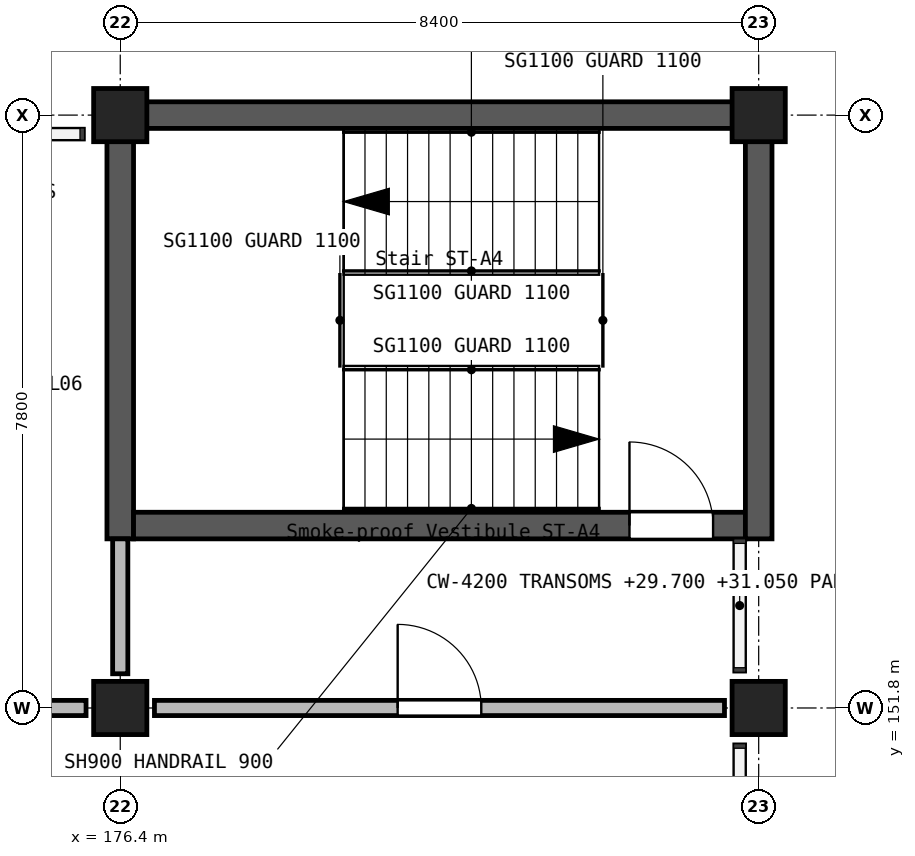
"""IFC4 building model, lengths in metres.
Left out: names, types, materials, properties, quantities, classifications, styles, units other than length and angle.
Written with IfcOpenShell. Run it as: python <this file> out.ifc"""

import sys

from ifc_helpers import new_model, si_unit, direction, frame, frame_2d, origin, origin_2d, place, context, subcontext, project, spatial, rectangle, extrude, element, fill, save


model = new_model("IFC4")
c1 = context("Model", 3, precision=1e-05, world=origin(), true_north=direction((0.0, 1.0)))
c2 = subcontext(c1, "Body", "Model", "MODEL_VIEW")
j1 = project(units=[si_unit("LENGTHUNIT", "METRE"), si_unit("PLANEANGLEUNIT", "RADIAN")], contexts=[c1])
p1 = place(None, origin())
s1 = spatial("IfcSite", under=j1, at=p1, CompositionType="ELEMENT")
p2 = place(p1, origin())
s2 = spatial("IfcBuilding", under=s1, at=p2, CompositionType="ELEMENT")
p3 = place(p2, frame((0.0, 0.0, 28.8)))
s3 = spatial("IfcBuildingStorey", under=s2, at=p3, CompositionType="ELEMENT", Elevation=28.8)
for number, where, z_axis, x_axis in (
    (1, (176.4, 151.8, 0.0), (0.0, 0.0, 1.0), (1.0, 0.0, 0.0)),
    (2, (176.4, 159.6, 0.0), (0.0, 0.0, 1.0), (1.0, 0.0, 0.0)),
    (3, (184.8, 151.8, 0.0), (0.0, 0.0, 1.0), (1.0, 0.0, 0.0)),
    (4, (184.8, 159.6, 0.0), (0.0, 0.0, 1.0), (1.0, 0.0, 0.0)),
):
    element("IfcColumn", number, at=place(p3, frame(where, z_axis=z_axis, x_axis=x_axis)), inside=s3, PredefinedType="COLUMN", context=c2, shape_type="SweptSolid", body=[
        extrude(rectangle(XDim=0.7, YDim=0.7, at=origin_2d()), origin(), (0.0, 0.0, 1.0), 3.9),
    ])
p4 = place(p3, frame((176.225, 159.6, 0.0), z_axis=(0.0, 0.0, 1.0), x_axis=(1.0, 0.0, 0.0)))
e5 = element("IfcWall", 5, at=p4, inside=s3, PredefinedType="SHEAR", context=c2, shape_type="SweptSolid", body=[
    extrude(rectangle(XDim=8.4, YDim=0.35, at=frame_2d((4.2, 0.0))), origin(), (0.0, 0.0, 1.0), 3.9),
])
p5 = place(p3, frame((176.4, 154.025, 0.0), z_axis=(0.0, 0.0, 1.0), x_axis=(0.0, 1.0, 0.0)))
e6 = element("IfcWall", 6, at=p5, inside=s3, PredefinedType="SHEAR", context=c2, shape_type="SweptSolid", body=[
    extrude(rectangle(XDim=5.4, YDim=0.35, at=frame_2d((2.7, 0.0))), origin(), (0.0, 0.0, 1.0), 3.9),
])
p6 = place(p3, frame((176.575, 154.2, 0.0), z_axis=(0.0, 0.0, 1.0), x_axis=(1.0, 0.0, 0.0)))
e7 = element("IfcWall", 7, at=p6, inside=s3, PredefinedType="SHEAR", context=c2, shape_type="SweptSolid", body=[
    extrude(rectangle(XDim=8.05, YDim=0.35, at=frame_2d((4.025, 0.0))), origin(), (0.0, 0.0, 1.0), 3.9),
])
p7 = place(p6, frame((6.525, 0.0, 0.0)))
e8 = element("IfcOpeningElement", 8, at=p7, cuts=e7, PredefinedType="OPENING", context=c2, shape_type="SweptSolid", body=[
    extrude(rectangle(XDim=1.1, YDim=2.1, at=frame_2d((0.55, 1.05))), frame((0.0, 0.185, 0.0), z_axis=(0.0, -1.0, 0.0), x_axis=(1.0, 0.0, 0.0)), (0.0, 0.0, 1.0), 0.37),
])
p8 = place(p3, frame((184.8, 154.025, 0.0), z_axis=(0.0, 0.0, 1.0), x_axis=(0.0, 1.0, 0.0)))
e9 = element("IfcWall", 9, at=p8, inside=s3, PredefinedType="SHEAR", context=c2, shape_type="SweptSolid", body=[
    extrude(rectangle(XDim=5.75, YDim=0.35, at=frame_2d((2.875, 0.0))), origin(), (0.0, 0.0, 1.0), 3.9),
])
p9 = place(p3, frame((172.1, 151.8, 0.0), z_axis=(0.0, 0.0, 1.0), x_axis=(1.0, 0.0, 0.0)))
e10 = element("IfcWall", 10, at=p9, inside=s3, PredefinedType="SOLIDWALL", context=c2, shape_type="SweptSolid", body=[
    extrude(rectangle(XDim=3.85, YDim=0.2, at=frame_2d((1.925, 0.0))), origin(), (0.0, 0.0, 1.0), 3.6),
])
p10 = place(p9, frame((1.7, 0.0, 0.0)))
e11 = element("IfcOpeningElement", 11, at=p10, cuts=e10, PredefinedType="OPENING", context=c2, shape_type="SweptSolid", body=[
    extrude(rectangle(XDim=1.0, YDim=2.1, at=frame_2d((0.5, 1.05))), frame((0.0, 0.11, 0.0), z_axis=(0.0, -1.0, 0.0), x_axis=(1.0, 0.0, 0.0)), (0.0, 0.0, 1.0), 0.22),
])
p11 = place(p3, frame((176.85, 151.8, 0.0), z_axis=(0.0, 0.0, 1.0), x_axis=(1.0, 0.0, 0.0)))
e12 = element("IfcWall", 12, at=p11, inside=s3, PredefinedType="SOLIDWALL", context=c2, shape_type="SweptSolid", body=[
    extrude(rectangle(XDim=7.5, YDim=0.2, at=frame_2d((3.75, 0.0))), origin(), (0.0, 0.0, 1.0), 3.6),
])
p12 = place(p11, frame((3.2, 0.0, 0.0)))
e13 = element("IfcOpeningElement", 13, at=p12, cuts=e12, PredefinedType="OPENING", context=c2, shape_type="SweptSolid", body=[
    extrude(rectangle(XDim=1.1, YDim=2.1, at=frame_2d((0.55, 1.05))), frame((0.0, 0.11, 0.0), z_axis=(0.0, -1.0, 0.0), x_axis=(1.0, 0.0, 0.0)), (0.0, 0.0, 1.0), 0.22),
])
p13 = place(p3, frame((176.4, 152.25, 0.0), z_axis=(0.0, 0.0, 1.0), x_axis=(0.0, 1.0, 0.0)))
e14 = element("IfcWall", 14, at=p13, inside=s3, PredefinedType="SOLIDWALL", context=c2, shape_type="SweptSolid", body=[
    extrude(rectangle(XDim=1.775, YDim=0.2, at=frame_2d((0.887, 0.0))), origin(), (0.0, 0.0, 1.0), 3.6),
])
p14 = place(p7, origin())
e15 = element("IfcDoor", 15, at=p14, inside=s3, OperationType="SINGLE_SWING_RIGHT", PredefinedType="DOOR", context=c2, shape_type="SweptSolid", body=[
    extrude(rectangle(XDim=1.1, YDim=2.1, at=frame_2d((0.55, 1.05))), frame((0.0, 0.025, 0.0), z_axis=(0.0, -1.0, 0.0), x_axis=(1.0, 0.0, 0.0)), (0.0, 0.0, 1.0), 0.05),
])
fill(e8, e15)
p15 = place(p12, origin())
e16 = element("IfcDoor", 16, at=p15, inside=s3, OperationType="SINGLE_SWING_RIGHT", PredefinedType="DOOR", context=c2, shape_type="SweptSolid", body=[
    extrude(rectangle(XDim=1.1, YDim=2.1, at=frame_2d((0.55, 1.05))), frame((0.0, 0.025, 0.0), z_axis=(0.0, -1.0, 0.0), x_axis=(1.0, 0.0, 0.0)), (0.0, 0.0, 1.0), 0.05),
])
fill(e13, e16)
save(model, sys.argv[1])
